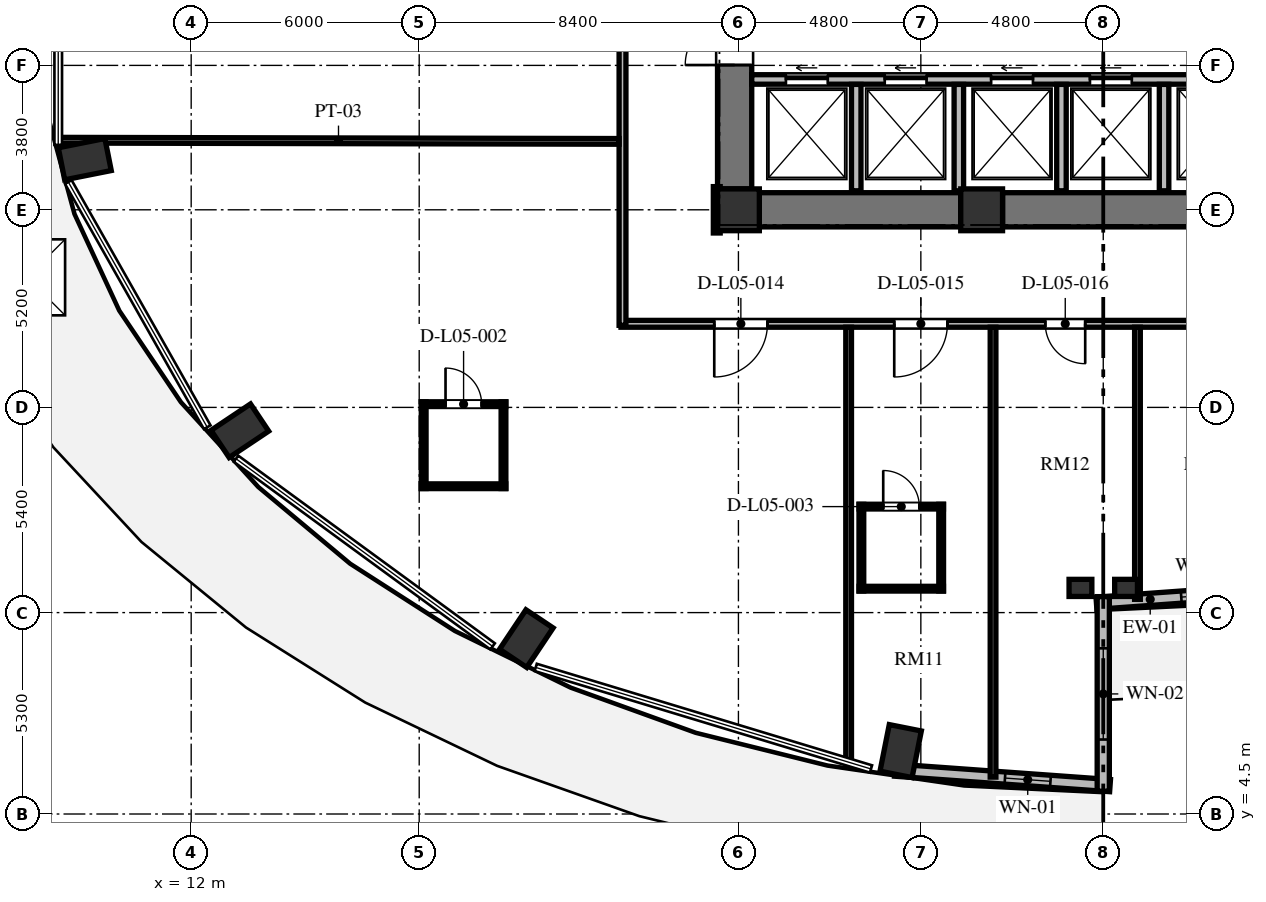
"""IFC4 building model, lengths in metres.
Left out: names, types, materials, properties, quantities, classifications, styles, units other than length and angle.
Written with IfcOpenShell. Run it as: python <this file> out.ifc"""

import sys

from ifc_helpers import new_model, si_unit, direction, frame, frame_2d, origin, origin_2d, place, context, subcontext, project, spatial, rectangle, extrude, element, fill, save


model = new_model("IFC4")
c1 = context("Model", 3, precision=1e-05, world=origin(), true_north=direction((0.0, 1.0)))
c2 = subcontext(c1, "Body", "Model", "MODEL_VIEW")
j1 = project(units=[si_unit("LENGTHUNIT", "METRE"), si_unit("PLANEANGLEUNIT", "RADIAN")], contexts=[c1])
p1 = place(None, origin())
s1 = spatial("IfcSite", under=j1, at=p1, CompositionType="ELEMENT")
p2 = place(p1, origin())
s2 = spatial("IfcBuilding", under=s1, at=p2, CompositionType="ELEMENT")
p3 = place(p2, frame((0.0, 0.0, 25.2)))
s3 = spatial("IfcBuildingStorey", under=s2, at=p3, CompositionType="ELEMENT", Elevation=25.2)
for number, where, z_axis, x_axis in (
    (1, (9.2, 21.732, 0.0), (0.0, 0.0, 1.0), (-0.981, -0.195, 0.0)),
    (2, (13.28, 14.586, 0.0), (0.0, 0.0, 1.0), (-0.831, -0.556, 0.0)),
    (3, (20.819, 9.116, 0.0), (0.0, 0.0, 1.0), (-0.556, -0.831, 0.0)),
    (4, (30.669, 6.156, 0.0), (0.0, 0.0, 1.0), (-0.195, -0.981, 0.0)),
):
    element("IfcColumn", number, at=place(p3, frame(where, z_axis=z_axis, x_axis=x_axis)), inside=s3, PredefinedType="COLUMN", context=c2, shape_type="SweptSolid", body=[
        extrude(rectangle(XDim=1.25, YDim=0.86, at=origin_2d()), origin(), (0.0, 0.0, 1.0), 3.648),
    ])
for number, where, z_axis, x_axis in (
    (5, (26.4, 20.4, 0.0), (0.0, 0.0, 1.0), (1.0, 0.0, 0.0)),
    (6, (32.8, 20.4, 0.0), (0.0, 0.0, 1.0), (1.0, 0.0, 0.0)),
):
    element("IfcColumn", number, at=place(p3, frame(where, z_axis=z_axis, x_axis=x_axis)), inside=s3, PredefinedType="COLUMN", context=c2, shape_type="SweptSolid", body=[
        extrude(rectangle(XDim=1.1, YDim=1.1, at=origin_2d()), origin(), (0.0, 0.0, 1.0), 3.648),
    ])
for number, where, z_axis, x_axis in (
    (7, (35.4, 10.45, 0.0), (0.0, 0.0, 1.0), (1.0, 0.0, 0.0)),
    (8, (36.6, 10.45, 0.0), (0.0, 0.0, 1.0), (1.0, 0.0, 0.0)),
):
    element("IfcColumn", number, at=place(p3, frame(where, z_axis=z_axis, x_axis=x_axis)), inside=s3, PredefinedType="PILASTER", context=c2, shape_type="SweptSolid", body=[
        extrude(rectangle(XDim=0.6, YDim=0.45, at=origin_2d()), origin(), (0.0, 0.0, 1.0), 3.648),
    ])
p4 = place(p3, frame((26.3, 20.95, 0.0), z_axis=(0.0, 0.0, 1.0), x_axis=(0.0, 1.0, 0.0)))
e9 = element("IfcWall", 9, at=p4, inside=s3, PredefinedType="SHEAR", context=c2, shape_type="SweptSolid", body=[
    extrude(rectangle(XDim=14.1, YDim=0.9, at=frame_2d((7.05, 0.0))), origin(), (0.0, 0.0, 1.0), 3.648),
])
p5 = place(p4, frame((6.5, 0.0, 0.0)))
e10 = element("IfcOpeningElement", 10, at=p5, cuts=e9, PredefinedType="OPENING", context=c2, shape_type="SweptSolid", body=[
    extrude(rectangle(XDim=1.2, YDim=2.15, at=frame_2d((0.6, 1.075))), frame((0.0, 0.46, 0.0), z_axis=(0.0, -1.0, 0.0), x_axis=(1.0, 0.0, 0.0)), (0.0, 0.0, 1.0), 0.92),
])
p6 = place(p4, frame((9.6, 0.0, 0.0)))
e11 = element("IfcOpeningElement", 11, at=p6, cuts=e9, PredefinedType="OPENING", context=c2, shape_type="SweptSolid", body=[
    extrude(rectangle(XDim=1.3, YDim=2.2, at=frame_2d((0.65, 1.1))), frame((0.0, 0.46, 0.0), z_axis=(0.0, -1.0, 0.0), x_axis=(1.0, 0.0, 0.0)), (0.0, 0.0, 1.0), 0.92),
])
p7 = place(p4, frame((3.26, 0.0, 0.0)))
e12 = element("IfcOpeningElement", 12, at=p7, cuts=e9, PredefinedType="OPENING", context=c2, shape_type="SweptSolid", body=[
    extrude(rectangle(XDim=1.3, YDim=2.2, at=frame_2d((0.65, 1.1))), frame((0.0, 0.46, 0.0), z_axis=(0.0, -1.0, 0.0), x_axis=(1.0, 0.0, 0.0)), (0.0, 0.0, 1.0), 0.92),
])
p8 = place(p3, frame((26.95, 20.4, 0.0), z_axis=(0.0, 0.0, 1.0), x_axis=(1.0, 0.0, 0.0)))
e13 = element("IfcWall", 13, at=p8, inside=s3, PredefinedType="SHEAR", context=c2, shape_type="SweptSolid", body=[
    extrude(rectangle(XDim=5.3, YDim=0.9, at=frame_2d((2.65, 0.0))), origin(), (0.0, 0.0, 1.0), 3.648),
])
p9 = place(p3, frame((33.35, 20.4, 0.0), z_axis=(0.0, 0.0, 1.0), x_axis=(1.0, 0.0, 0.0)))
e14 = element("IfcWall", 14, at=p9, inside=s3, PredefinedType="SHEAR", context=c2, shape_type="SweptSolid", body=[
    extrude(rectangle(XDim=5.3, YDim=0.9, at=frame_2d((2.65, 0.0))), origin(), (0.0, 0.0, 1.0), 3.648),
])
p10 = place(p3, frame((35.821, 10.047, 0.0), z_axis=(0.0, 0.0, 1.0), x_axis=(0.997422321809, 0.071754525696, 0.0)))
e15 = element("IfcWall", 15, at=p10, inside=s3, PredefinedType="SOLIDWALL", context=c2, shape_type="SweptSolid", body=[
    extrude(rectangle(XDim=5.675, YDim=0.32, at=frame_2d((2.838, 0.0))), origin(), (0.0, 0.0, 1.0), 3.428),
])
p11 = place(p10, frame((2.238, 0.0, 0.85)))
e16 = element("IfcOpeningElement", 16, at=p11, cuts=e15, PredefinedType="OPENING", context=c2, shape_type="SweptSolid", body=[
    extrude(rectangle(XDim=1.2, YDim=1.8, at=frame_2d((0.6, 0.9))), frame((0.0, 0.17, 0.0), z_axis=(0.0, -1.0, 0.0), x_axis=(1.0, 0.0, 0.0)), (0.0, 0.0, 1.0), 0.34),
])
p12 = place(p3, frame((30.519, 5.654, 0.0), z_axis=(0.0, 0.0, 1.0), x_axis=(0.997421878774, -0.071760683825, 0.0)))
e17 = element("IfcWall", 17, at=p12, inside=s3, PredefinedType="SOLIDWALL", context=c2, shape_type="SweptSolid", body=[
    extrude(rectangle(XDim=5.675, YDim=0.32, at=frame_2d((2.837, 0.0))), origin(), (0.0, 0.0, 1.0), 3.428),
])
p13 = place(p12, frame((2.903, 0.0, 0.85)))
e18 = element("IfcOpeningElement", 18, at=p13, cuts=e17, PredefinedType="OPENING", context=c2, shape_type="SweptSolid", body=[
    extrude(rectangle(XDim=1.2, YDim=2.2, at=frame_2d((0.6, 1.1))), frame((0.0, 0.17, 0.0), z_axis=(0.0, -1.0, 0.0), x_axis=(1.0, 0.0, 0.0)), (0.0, 0.0, 1.0), 0.34),
])
p14 = place(p3, frame((36.0, 5.1, 0.0), z_axis=(0.0, 0.0, 1.0), x_axis=(0.0, 1.0, 0.0)))
e19 = element("IfcWall", 19, at=p14, inside=s3, PredefinedType="SOLIDWALL", context=c2, shape_type="SweptSolid", body=[
    extrude(rectangle(XDim=5.12, YDim=0.32, at=frame_2d((2.56, 0.0))), origin(), (0.0, 0.0, 1.0), 3.428),
])
p15 = place(p14, frame((1.36, 0.0, 0.84)))
e20 = element("IfcOpeningElement", 20, at=p15, cuts=e19, PredefinedType="OPENING", context=c2, shape_type="SweptSolid", body=[
    extrude(rectangle(XDim=2.4, YDim=2.04, at=frame_2d((1.2, 1.02))), frame((0.0, 0.17, 0.0), z_axis=(0.0, -1.0, 0.0), x_axis=(1.0, 0.0, 0.0)), (0.0, 0.0, 1.0), 0.34),
])
p16 = place(p3, frame((26.75, 23.83, 0.0), z_axis=(0.0, 0.0, 1.0), x_axis=(1.0, 0.0, 0.0)))
e21 = element("IfcWall", 21, at=p16, inside=s3, PredefinedType="SOLIDWALL", context=c2, shape_type="SweptSolid", body=[
    extrude(rectangle(XDim=16.2, YDim=0.25, at=frame_2d((8.1, 0.0))), origin(), (0.0, 0.0, 1.0), 3.428),
])
p17 = place(p16, frame((0.9, 0.0, 0.0)))
e22 = element("IfcOpeningElement", 22, at=p17, cuts=e21, PredefinedType="OPENING", context=c2, shape_type="SweptSolid", body=[
    extrude(rectangle(XDim=1.1, YDim=2.2, at=frame_2d((0.55, 1.1))), frame((0.0, 0.135, 0.0), z_axis=(0.0, -1.0, 0.0), x_axis=(1.0, 0.0, 0.0)), (0.0, 0.0, 1.0), 0.27),
])
p18 = place(p16, frame((3.5, 0.0, 0.0)))
e23 = element("IfcOpeningElement", 23, at=p18, cuts=e21, PredefinedType="OPENING", context=c2, shape_type="SweptSolid", body=[
    extrude(rectangle(XDim=1.1, YDim=2.2, at=frame_2d((0.55, 1.1))), frame((0.0, 0.135, 0.0), z_axis=(0.0, -1.0, 0.0), x_axis=(1.0, 0.0, 0.0)), (0.0, 0.0, 1.0), 0.27),
])
p19 = place(p16, frame((6.3, 0.0, 0.0)))
e24 = element("IfcOpeningElement", 24, at=p19, cuts=e21, PredefinedType="OPENING", context=c2, shape_type="SweptSolid", body=[
    extrude(rectangle(XDim=1.1, YDim=2.2, at=frame_2d((0.55, 1.1))), frame((0.0, 0.135, 0.0), z_axis=(0.0, -1.0, 0.0), x_axis=(1.0, 0.0, 0.0)), (0.0, 0.0, 1.0), 0.27),
])
p20 = place(p16, frame((8.9, 0.0, 0.0)))
e25 = element("IfcOpeningElement", 25, at=p20, cuts=e21, PredefinedType="OPENING", context=c2, shape_type="SweptSolid", body=[
    extrude(rectangle(XDim=1.1, YDim=2.2, at=frame_2d((0.55, 1.1))), frame((0.0, 0.135, 0.0), z_axis=(0.0, -1.0, 0.0), x_axis=(1.0, 0.0, 0.0)), (0.0, 0.0, 1.0), 0.27),
])
p21 = place(p16, frame((11.7, 0.0, 0.0)))
e26 = element("IfcOpeningElement", 26, at=p21, cuts=e21, PredefinedType="OPENING", context=c2, shape_type="SweptSolid", body=[
    extrude(rectangle(XDim=1.1, YDim=2.2, at=frame_2d((0.55, 1.1))), frame((0.0, 0.135, 0.0), z_axis=(0.0, -1.0, 0.0), x_axis=(1.0, 0.0, 0.0)), (0.0, 0.0, 1.0), 0.27),
])
p22 = place(p16, frame((14.15, 0.0, 0.0)))
e27 = element("IfcOpeningElement", 27, at=p22, cuts=e21, PredefinedType="OPENING", context=c2, shape_type="SweptSolid", body=[
    extrude(rectangle(XDim=1.4, YDim=2.3, at=frame_2d((0.7, 1.15))), frame((0.0, 0.135, 0.0), z_axis=(0.0, -1.0, 0.0), x_axis=(1.0, 0.0, 0.0)), (0.0, 0.0, 1.0), 0.27),
])
for number, where, z_axis, x_axis in (
    (28, (29.5, 20.9, 0.0), (0.0, 0.0, 1.0), (0.0, 1.0, 0.0)),
    (29, (32.2, 20.9, 0.0), (0.0, 0.0, 1.0), (0.0, 1.0, 0.0)),
    (30, (34.9, 20.9, 0.0), (0.0, 0.0, 1.0), (0.0, 1.0, 0.0)),
    (31, (37.6, 20.9, 0.0), (0.0, 0.0, 1.0), (0.0, 1.0, 0.0)),
):
    element("IfcWall", number, at=place(p3, frame(where, z_axis=z_axis, x_axis=x_axis)), inside=s3, PredefinedType="SOLIDWALL", context=c2, shape_type="SweptSolid", body=[
        extrude(rectangle(XDim=2.8, YDim=0.25, at=frame_2d((1.4, 0.0))), origin(), (0.0, 0.0, 1.0), 3.428),
    ])
p23 = place(p3, frame((25.83, 21.01, 0.0), z_axis=(0.0, 0.0, 1.0), x_axis=(0.0, -1.0, 0.0)))
e32 = element("IfcWall", 32, at=p23, inside=s3, PredefinedType="PARTITIONING", context=c2, shape_type="SweptSolid", body=[
    extrude(rectangle(XDim=1.22, YDim=0.18, at=frame_2d((0.61, 0.0))), origin(), (0.0, 0.0, 1.0), 3.428),
])
p24 = place(p3, frame((45.24, 17.4, 0.0), z_axis=(0.0, 0.0, 1.0), x_axis=(-1.0, 0.0, 0.0)))
e33 = element("IfcWall", 33, at=p24, inside=s3, PredefinedType="PARTITIONING", context=c2, shape_type="SweptSolid", body=[
    extrude(rectangle(XDim=21.93, YDim=0.18, at=frame_2d((10.965, 0.0))), origin(), (0.0, 0.0, 1.0), 3.053),
])
p25 = place(p24, frame((18.076, 0.0, 0.0)))
e34 = element("IfcOpeningElement", 34, at=p25, cuts=e33, PredefinedType="OPENING", context=c2, shape_type="SweptSolid", body=[
    extrude(rectangle(XDim=1.4, YDim=2.2, at=frame_2d((0.7, 1.1))), frame((0.0, 0.1, 0.0), z_axis=(0.0, -1.0, 0.0), x_axis=(1.0, 0.0, 0.0)), (0.0, 0.0, 1.0), 0.2),
])
p26 = place(p24, frame((13.34, 0.0, 0.0)))
e35 = element("IfcOpeningElement", 35, at=p26, cuts=e33, PredefinedType="OPENING", context=c2, shape_type="SweptSolid", body=[
    extrude(rectangle(XDim=1.4, YDim=2.2, at=frame_2d((0.7, 1.1))), frame((0.0, 0.1, 0.0), z_axis=(0.0, -1.0, 0.0), x_axis=(1.0, 0.0, 0.0)), (0.0, 0.0, 1.0), 0.2),
])
p27 = place(p24, frame((9.715, 0.0, 0.0)))
e36 = element("IfcOpeningElement", 36, at=p27, cuts=e33, PredefinedType="OPENING", context=c2, shape_type="SweptSolid", body=[
    extrude(rectangle(XDim=1.05, YDim=2.15, at=frame_2d((0.525, 1.075))), frame((0.0, 0.1, 0.0), z_axis=(0.0, -1.0, 0.0), x_axis=(1.0, 0.0, 0.0)), (0.0, 0.0, 1.0), 0.2),
])
p28 = place(p24, frame((4.916, 0.0, 0.0)))
e37 = element("IfcOpeningElement", 37, at=p28, cuts=e33, PredefinedType="OPENING", context=c2, shape_type="SweptSolid", body=[
    extrude(rectangle(XDim=1.05, YDim=2.15, at=frame_2d((0.525, 1.075))), frame((0.0, 0.1, 0.0), z_axis=(0.0, -1.0, 0.0), x_axis=(1.0, 0.0, 0.0)), (0.0, 0.0, 1.0), 0.2),
])
p29 = place(p24, frame((1.729, 0.0, 0.0)))
e38 = element("IfcOpeningElement", 38, at=p29, cuts=e33, PredefinedType="OPENING", context=c2, shape_type="SweptSolid", body=[
    extrude(rectangle(XDim=1.4, YDim=2.2, at=frame_2d((0.7, 1.1))), frame((0.0, 0.1, 0.0), z_axis=(0.0, -1.0, 0.0), x_axis=(1.0, 0.0, 0.0)), (0.0, 0.0, 1.0), 0.2),
])
p30 = place(p3, frame((23.35, 17.36, 0.0), z_axis=(0.0, 0.0, 1.0), x_axis=(0.0, 1.0, 0.0)))
e39 = element("IfcWall", 39, at=p30, inside=s3, PredefinedType="PARTITIONING", context=c2, shape_type="SweptSolid", body=[
    extrude(rectangle(XDim=9.28, YDim=0.18, at=frame_2d((4.64, 0.0))), origin(), (0.0, 0.0, 1.0), 3.428),
])
p31 = place(p3, frame((8.493, 22.231, 0.0), z_axis=(0.0, 0.0, 1.0), x_axis=(0.999997760873, -0.002116187438, 0.0)))
e40 = element("IfcWall", 40, at=p31, inside=s3, PredefinedType="PARTITIONING", context=c2, shape_type="SweptSolid", body=[
    extrude(rectangle(XDim=14.767, YDim=0.15, at=frame_2d((7.384, 0.0))), origin(), (0.0, 0.0, 1.0), 3.428),
])
p32 = place(p3, frame((29.3, 5.876, 0.0), z_axis=(0.0, 0.0, 1.0), x_axis=(0.0, 1.0, 0.0)))
e41 = element("IfcWall", 41, at=p32, inside=s3, PredefinedType="PARTITIONING", context=c2, shape_type="SweptSolid", body=[
    extrude(rectangle(XDim=11.434, YDim=0.15, at=frame_2d((5.717, 0.0))), origin(), (0.0, 0.0, 1.0), 3.428),
])
p33 = place(p3, frame((33.1, 5.471, 0.0), z_axis=(0.0, 0.0, 1.0), x_axis=(0.0, 1.0, 0.0)))
e42 = element("IfcWall", 42, at=p33, inside=s3, PredefinedType="PARTITIONING", context=c2, shape_type="SweptSolid", body=[
    extrude(rectangle(XDim=11.839, YDim=0.15, at=frame_2d((5.919, 0.0))), origin(), (0.0, 0.0, 1.0), 3.428),
])
p34 = place(p3, frame((36.9, 10.15, 0.0), z_axis=(0.0, 0.0, 1.0), x_axis=(0.0, 1.0, 0.0)))
e43 = element("IfcWall", 43, at=p34, inside=s3, PredefinedType="PARTITIONING", context=c2, shape_type="SweptSolid", body=[
    extrude(rectangle(XDim=7.16, YDim=0.15, at=frame_2d((3.58, 0.0))), origin(), (0.0, 0.0, 1.0), 3.428),
])
p35 = place(p3, frame((18.058, 15.285, 0.0), z_axis=(0.0, 0.0, 1.0), x_axis=(1.0, 0.0, 0.0)))
e44 = element("IfcWall", 44, at=p35, inside=s3, PredefinedType="PARTITIONING", context=c2, shape_type="SweptSolid", body=[
    extrude(rectangle(XDim=2.22, YDim=0.125, at=frame_2d((1.11, 0.0))), origin(), (0.0, 0.0, 1.0), 3.428),
])
p36 = place(p35, frame((0.635, 0.0, 0.0)))
e45 = element("IfcOpeningElement", 45, at=p36, cuts=e44, PredefinedType="OPENING", context=c2, shape_type="SweptSolid", body=[
    extrude(rectangle(XDim=0.95, YDim=2.1, at=frame_2d((0.475, 1.05))), frame((0.0, 0.073, 0.0), z_axis=(0.0, -1.0, 0.0), x_axis=(1.0, 0.0, 0.0)), (0.0, 0.0, 1.0), 0.145),
])
p37 = place(p3, frame((18.058, 13.125, 0.0), z_axis=(0.0, 0.0, 1.0), x_axis=(1.0, 0.0, 0.0)))
e46 = element("IfcWall", 46, at=p37, inside=s3, PredefinedType="PARTITIONING", context=c2, shape_type="SweptSolid", body=[
    extrude(rectangle(XDim=2.22, YDim=0.125, at=frame_2d((1.11, 0.0))), origin(), (0.0, 0.0, 1.0), 3.428),
])
for number, where, z_axis, x_axis in (
    (47, (20.218, 13.065, 0.0), (0.0, 0.0, 1.0), (0.0, 1.0, 0.0)),
    (48, (18.118, 13.065, 0.0), (0.0, 0.0, 1.0), (0.0, 1.0, 0.0)),
):
    element("IfcWall", number, at=place(p3, frame(where, z_axis=z_axis, x_axis=x_axis)), inside=s3, PredefinedType="PARTITIONING", context=c2, shape_type="SweptSolid", body=[
        extrude(rectangle(XDim=2.28, YDim=0.125, at=frame_2d((1.14, 0.0))), origin(), (0.0, 0.0, 1.0), 3.428),
    ])
p38 = place(p3, frame((29.575, 12.589, 0.0), z_axis=(0.0, 0.0, 1.0), x_axis=(1.0, 0.0, 0.0)))
e49 = element("IfcWall", 49, at=p38, inside=s3, PredefinedType="PARTITIONING", context=c2, shape_type="SweptSolid", body=[
    extrude(rectangle(XDim=2.22, YDim=0.125, at=frame_2d((1.11, 0.0))), origin(), (0.0, 0.0, 1.0), 3.428),
])
p39 = place(p38, frame((0.635, 0.0, 0.0)))
e50 = element("IfcOpeningElement", 50, at=p39, cuts=e49, PredefinedType="OPENING", context=c2, shape_type="SweptSolid", body=[
    extrude(rectangle(XDim=0.95, YDim=2.1, at=frame_2d((0.475, 1.05))), frame((0.0, 0.073, 0.0), z_axis=(0.0, -1.0, 0.0), x_axis=(1.0, 0.0, 0.0)), (0.0, 0.0, 1.0), 0.145),
])
p40 = place(p3, frame((29.575, 10.429, 0.0), z_axis=(0.0, 0.0, 1.0), x_axis=(1.0, 0.0, 0.0)))
e51 = element("IfcWall", 51, at=p40, inside=s3, PredefinedType="PARTITIONING", context=c2, shape_type="SweptSolid", body=[
    extrude(rectangle(XDim=2.22, YDim=0.125, at=frame_2d((1.11, 0.0))), origin(), (0.0, 0.0, 1.0), 3.428),
])
p41 = place(p3, frame((31.735, 10.369, 0.0), z_axis=(0.0, 0.0, 1.0), x_axis=(0.0, 1.0, 0.0)))
e52 = element("IfcWall", 52, at=p41, inside=s3, PredefinedType="PARTITIONING", context=c2, shape_type="SweptSolid", body=[
    extrude(rectangle(XDim=2.28, YDim=0.125, at=frame_2d((1.14, 0.0))), origin(), (0.0, 0.0, 1.0), 2.813),
])
p42 = place(p3, frame((29.635, 10.369, 0.0), z_axis=(0.0, 0.0, 1.0), x_axis=(0.0, 1.0, 0.0)))
e53 = element("IfcWall", 53, at=p42, inside=s3, PredefinedType="PARTITIONING", context=c2, shape_type="SweptSolid", body=[
    extrude(rectangle(XDim=2.28, YDim=0.125, at=frame_2d((1.14, 0.0))), origin(), (0.0, 0.0, 1.0), 3.428),
])
p43 = place(p3, frame((0.0, 0.0, -0.22)))
p44 = place(p43, frame((7.682, 18.623, 0.0)))
p45 = place(p44, frame((0.0, 0.0, 0.22)))
e54 = element("IfcWindow", 54, at=p45, inside=s3, PartitioningType="SINGLE_PANEL", PredefinedType="SKYLIGHT", context=c2, shape_type="SweptSolid", body=[
    extrude(rectangle(XDim=2.0, YDim=2.0, at=origin_2d()), origin(), (0.0, 0.0, 1.0), 0.05),
])
p46 = place(p11, origin())
e55 = element("IfcWindow", 55, at=p46, inside=s3, PartitioningType="SINGLE_PANEL", PredefinedType="WINDOW", context=c2, shape_type="SweptSolid", body=[
    extrude(rectangle(XDim=1.2, YDim=1.8, at=frame_2d((0.6, 0.9))), frame((0.0, 0.03, 0.0), z_axis=(0.0, -1.0, 0.0), x_axis=(1.0, 0.0, 0.0)), (0.0, 0.0, 1.0), 0.06),
])
fill(e16, e55)
p47 = place(p13, origin())
e56 = element("IfcWindow", 56, at=p47, inside=s3, PartitioningType="SINGLE_PANEL", PredefinedType="WINDOW", context=c2, shape_type="SweptSolid", body=[
    extrude(rectangle(XDim=1.2, YDim=2.2, at=frame_2d((0.6, 1.1))), frame((0.0, 0.03, 0.0), z_axis=(0.0, -1.0, 0.0), x_axis=(1.0, 0.0, 0.0)), (0.0, 0.0, 1.0), 0.06),
])
fill(e18, e56)
p48 = place(p15, origin())
e57 = element("IfcWindow", 57, at=p48, inside=s3, PartitioningType="SINGLE_PANEL", PredefinedType="WINDOW", context=c2, shape_type="SweptSolid", body=[
    extrude(rectangle(XDim=2.4, YDim=2.04, at=frame_2d((1.2, 1.02))), frame((0.0, 0.03, 0.0), z_axis=(0.0, -1.0, 0.0), x_axis=(1.0, 0.0, 0.0)), (0.0, 0.0, 1.0), 0.06),
])
fill(e20, e57)
p49 = place(p7, origin())
e58 = element("IfcDoor", 58, at=p49, inside=s3, OperationType="SINGLE_SWING_LEFT", PredefinedType="DOOR", context=c2, shape_type="SweptSolid", body=[
    extrude(rectangle(XDim=1.3, YDim=2.2, at=frame_2d((0.65, 1.1))), frame((0.0, 0.025, 0.0), z_axis=(0.0, -1.0, 0.0), x_axis=(1.0, 0.0, 0.0)), (0.0, 0.0, 1.0), 0.05),
])
fill(e12, e58)
p50 = place(p17, origin())
e59 = element("IfcDoor", 59, at=p50, inside=s3, OperationType="SLIDING_TO_LEFT", PredefinedType="DOOR", context=c2, shape_type="SweptSolid", body=[
    extrude(rectangle(XDim=1.1, YDim=2.2, at=frame_2d((0.55, 1.1))), frame((0.0, 0.025, 0.0), z_axis=(0.0, -1.0, 0.0), x_axis=(1.0, 0.0, 0.0)), (0.0, 0.0, 1.0), 0.05),
])
fill(e22, e59)
p51 = place(p18, origin())
e60 = element("IfcDoor", 60, at=p51, inside=s3, OperationType="SLIDING_TO_LEFT", PredefinedType="DOOR", context=c2, shape_type="SweptSolid", body=[
    extrude(rectangle(XDim=1.1, YDim=2.2, at=frame_2d((0.55, 1.1))), frame((0.0, 0.025, 0.0), z_axis=(0.0, -1.0, 0.0), x_axis=(1.0, 0.0, 0.0)), (0.0, 0.0, 1.0), 0.05),
])
fill(e23, e60)
p52 = place(p19, origin())
e61 = element("IfcDoor", 61, at=p52, inside=s3, OperationType="SLIDING_TO_LEFT", PredefinedType="DOOR", context=c2, shape_type="SweptSolid", body=[
    extrude(rectangle(XDim=1.1, YDim=2.2, at=frame_2d((0.55, 1.1))), frame((0.0, 0.025, 0.0), z_axis=(0.0, -1.0, 0.0), x_axis=(1.0, 0.0, 0.0)), (0.0, 0.0, 1.0), 0.05),
])
fill(e24, e61)
p53 = place(p20, origin())
e62 = element("IfcDoor", 62, at=p53, inside=s3, OperationType="SLIDING_TO_LEFT", PredefinedType="DOOR", context=c2, shape_type="SweptSolid", body=[
    extrude(rectangle(XDim=1.1, YDim=2.2, at=frame_2d((0.55, 1.1))), frame((0.0, 0.025, 0.0), z_axis=(0.0, -1.0, 0.0), x_axis=(1.0, 0.0, 0.0)), (0.0, 0.0, 1.0), 0.05),
])
fill(e25, e62)
p54 = place(p36, origin())
e63 = element("IfcDoor", 63, at=p54, inside=s3, OperationType="SINGLE_SWING_LEFT", PredefinedType="DOOR", context=c2, shape_type="SweptSolid", body=[
    extrude(rectangle(XDim=0.95, YDim=2.1, at=frame_2d((0.475, 1.05))), frame((0.0, 0.025, 0.0), z_axis=(0.0, -1.0, 0.0), x_axis=(1.0, 0.0, 0.0)), (0.0, 0.0, 1.0), 0.05),
])
fill(e45, e63)
p55 = place(p25, origin())
e64 = element("IfcDoor", 64, at=p55, inside=s3, OperationType="SINGLE_SWING_RIGHT", PredefinedType="DOOR", context=c2, shape_type="SweptSolid", body=[
    extrude(rectangle(XDim=1.4, YDim=2.2, at=frame_2d((0.7, 1.1))), frame((0.0, 0.025, 0.0), z_axis=(0.0, -1.0, 0.0), x_axis=(1.0, 0.0, 0.0)), (0.0, 0.0, 1.0), 0.05),
])
fill(e34, e64)
p56 = place(p39, origin())
e65 = element("IfcDoor", 65, at=p56, inside=s3, OperationType="SINGLE_SWING_LEFT", PredefinedType="DOOR", context=c2, shape_type="SweptSolid", body=[
    extrude(rectangle(XDim=0.95, YDim=2.1, at=frame_2d((0.475, 1.05))), frame((0.0, 0.025, 0.0), z_axis=(0.0, -1.0, 0.0), x_axis=(1.0, 0.0, 0.0)), (0.0, 0.0, 1.0), 0.05),
])
fill(e50, e65)
p57 = place(p26, origin())
e66 = element("IfcDoor", 66, at=p57, inside=s3, OperationType="SINGLE_SWING_RIGHT", PredefinedType="DOOR", context=c2, shape_type="SweptSolid", body=[
    extrude(rectangle(XDim=1.4, YDim=2.2, at=frame_2d((0.7, 1.1))), frame((0.0, 0.025, 0.0), z_axis=(0.0, -1.0, 0.0), x_axis=(1.0, 0.0, 0.0)), (0.0, 0.0, 1.0), 0.05),
])
fill(e35, e66)
p58 = place(p27, origin())
e67 = element("IfcDoor", 67, at=p58, inside=s3, OperationType="SINGLE_SWING_LEFT", PredefinedType="DOOR", context=c2, shape_type="SweptSolid", body=[
    extrude(rectangle(XDim=1.05, YDim=2.15, at=frame_2d((0.525, 1.075))), frame((0.0, 0.025, 0.0), z_axis=(0.0, -1.0, 0.0), x_axis=(1.0, 0.0, 0.0)), (0.0, 0.0, 1.0), 0.05),
])
fill(e36, e67)
save(model, sys.argv[1])
